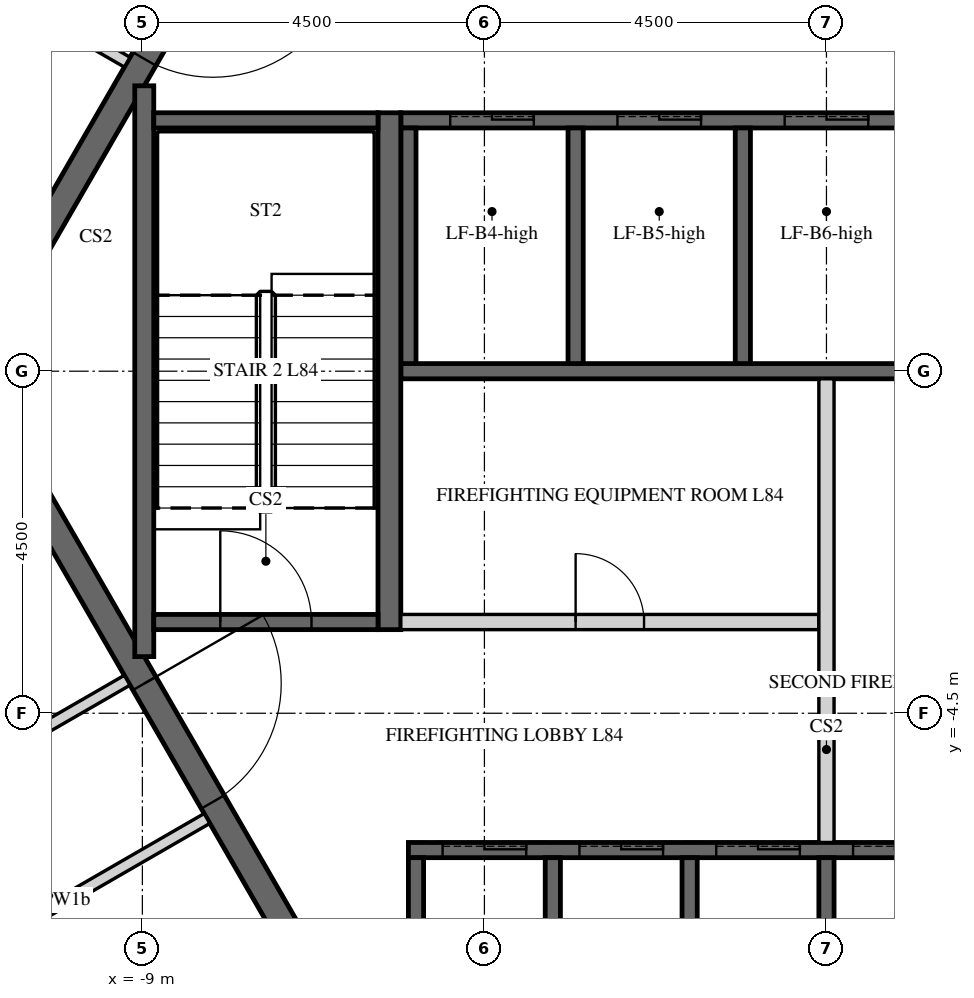
"""IFC4 building model, lengths in metres.
Left out: names, types, materials, properties, quantities, classifications, styles, units other than length and angle.
Written with IfcOpenShell. Run it as: python <this file> out.ifc"""

import sys

from ifc_helpers import new_model, si_unit, direction, frame, frame_2d, origin, place, context, subcontext, project, spatial, polyline, rectangle, outline, extrude, element, fill, save


model = new_model("IFC4")
c1 = context("Model", 3, precision=1e-05, world=origin(), true_north=direction((0.0, 1.0)))
c2 = subcontext(c1, "Body", "Model", "MODEL_VIEW")
j1 = project(units=[si_unit("LENGTHUNIT", "METRE"), si_unit("PLANEANGLEUNIT", "RADIAN")], contexts=[c1])
p1 = place(None, origin())
s1 = spatial("IfcSite", under=j1, at=p1, CompositionType="ELEMENT")
p2 = place(p1, origin())
s2 = spatial("IfcBuilding", under=s1, at=p2, CompositionType="ELEMENT")
p3 = place(p2, frame((0.0, 0.0, 349.5)))
s3 = spatial("IfcBuildingStorey", under=s2, at=p3, CompositionType="ELEMENT", Elevation=349.5)
p4 = place(p3, frame((-5.673, 9.825, 0.0), z_axis=(0.0, 0.0, 1.0), x_axis=(-0.499995046907, -0.866028263435, 0.0)))
e1 = element("IfcWall", 1, at=p4, inside=s3, PredefinedType="SHEAR", context=c2, shape_type="SweptSolid", body=[
    extrude(outline(polyline([(-0.101, -0.175), (11.446, -0.175), (11.244, 0.175), (0.101, 0.175), (-0.101, -0.175)])), origin(), (0.0, 0.0, 1.0), 3.75),
])
p5 = place(p4, frame((4.801, 0.0, 0.0)))
e2 = element("IfcOpeningElement", 2, at=p5, cuts=e1, PredefinedType="OPENING", context=c2, shape_type="SweptSolid", body=[
    extrude(rectangle(XDim=1.8, YDim=2.4, at=frame_2d((0.9, 1.2))), frame((0.0, 0.185, 0.0), z_axis=(0.0, -1.0, 0.0), x_axis=(1.0, 0.0, 0.0)), (0.0, 0.0, 1.0), 0.37),
])
p6 = place(p3, frame((-11.345, 0.0, 0.0), z_axis=(0.0, 0.0, 1.0), x_axis=(0.499995046907, -0.866028263435, 0.0)))
e3 = element("IfcWall", 3, at=p6, inside=s3, PredefinedType="SHEAR", context=c2, shape_type="SweptSolid", body=[
    extrude(outline(polyline([(-0.101, -0.175), (11.446, -0.175), (11.244, 0.175), (0.101, 0.175), (-0.101, -0.175)])), origin(), (0.0, 0.0, 1.0), 3.75),
])
p7 = place(p6, frame((4.744, 0.0, 0.0)))
e4 = element("IfcOpeningElement", 4, at=p7, cuts=e3, PredefinedType="OPENING", context=c2, shape_type="SweptSolid", body=[
    extrude(rectangle(XDim=1.8, YDim=2.4, at=frame_2d((0.9, 1.2))), frame((0.0, 0.185, 0.0), z_axis=(0.0, -1.0, 0.0), x_axis=(1.0, 0.0, 0.0)), (0.0, 0.0, 1.0), 0.37),
])
p8 = place(p3, frame((-5.6, 3.3, -0.5), z_axis=(0.0, 0.0, 1.0), x_axis=(1.0, 0.0, 0.0)))
e5 = element("IfcWall", 5, at=p8, inside=s3, PredefinedType="SHEAR", context=c2, shape_type="SweptSolid", body=[
    extrude(rectangle(XDim=6.6, YDim=0.2, at=frame_2d((3.3, 0.0))), origin(), (0.0, 0.0, 1.0), 4.15),
])
p9 = place(p8, frame((0.65, 0.0, 0.5)))
e6 = element("IfcOpeningElement", 6, at=p9, cuts=e5, PredefinedType="OPENING", context=c2, shape_type="SweptSolid", body=[
    extrude(rectangle(XDim=1.1, YDim=2.1, at=frame_2d((0.55, 1.05))), frame((0.0, 0.11, 0.0), z_axis=(0.0, -1.0, 0.0), x_axis=(1.0, 0.0, 0.0)), (0.0, 0.0, 1.0), 0.22),
])
p10 = place(p8, frame((2.85, 0.0, 0.5)))
e7 = element("IfcOpeningElement", 7, at=p10, cuts=e5, PredefinedType="OPENING", context=c2, shape_type="SweptSolid", body=[
    extrude(rectangle(XDim=1.1, YDim=2.1, at=frame_2d((0.55, 1.05))), frame((0.0, 0.11, 0.0), z_axis=(0.0, -1.0, 0.0), x_axis=(1.0, 0.0, 0.0)), (0.0, 0.0, 1.0), 0.22),
])
p11 = place(p8, frame((5.05, 0.0, 0.5)))
e8 = element("IfcOpeningElement", 8, at=p11, cuts=e5, PredefinedType="OPENING", context=c2, shape_type="SweptSolid", body=[
    extrude(rectangle(XDim=1.1, YDim=2.1, at=frame_2d((0.55, 1.05))), frame((0.0, 0.11, 0.0), z_axis=(0.0, -1.0, 0.0), x_axis=(1.0, 0.0, 0.0)), (0.0, 0.0, 1.0), 0.22),
])
p12 = place(p3, frame((-5.6, 0.0, -0.5), z_axis=(0.0, 0.0, 1.0), x_axis=(1.0, 0.0, 0.0)))
e9 = element("IfcWall", 9, at=p12, inside=s3, PredefinedType="SHEAR", context=c2, shape_type="SweptSolid", body=[
    extrude(rectangle(XDim=11.2, YDim=0.2, at=frame_2d((5.6, 0.0))), origin(), (0.0, 0.0, 1.0), 4.15),
])
for number, where, z_axis, x_axis in (
    (10, (-5.5, 0.1, -0.5), (0.0, 0.0, 1.0), (0.0, 1.0, 0.0)),
    (11, (-3.3, 0.1, -0.5), (0.0, 0.0, 1.0), (0.0, 1.0, 0.0)),
    (12, (-1.1, 0.1, -0.5), (0.0, 0.0, 1.0), (0.0, 1.0, 0.0)),
):
    element("IfcWall", number, at=place(p3, frame(where, z_axis=z_axis, x_axis=x_axis)), inside=s3, PredefinedType="SHEAR", context=c2, shape_type="SweptSolid", body=[
        extrude(rectangle(XDim=3.1, YDim=0.2, at=frame_2d((1.55, 0.0))), origin(), (0.0, 0.0, 1.0), 4.15),
    ])
p13 = place(p3, frame((-5.5, -6.3, -0.5), z_axis=(0.0, 0.0, 1.0), x_axis=(1.0, 0.0, 0.0)))
e13 = element("IfcWall", 13, at=p13, inside=s3, PredefinedType="SHEAR", context=c2, shape_type="SweptSolid", body=[
    extrude(rectangle(XDim=9.2, YDim=0.2, at=frame_2d((4.6, 0.0))), origin(), (0.0, 0.0, 1.0), 4.15),
])
p14 = place(p13, frame((0.45, 0.0, 0.5)))
e14 = element("IfcOpeningElement", 14, at=p14, cuts=e13, PredefinedType="OPENING", context=c2, shape_type="SweptSolid", body=[
    extrude(rectangle(XDim=1.1, YDim=2.1, at=frame_2d((0.55, 1.05))), frame((0.0, 0.11, 0.0), z_axis=(0.0, -1.0, 0.0), x_axis=(1.0, 0.0, 0.0)), (0.0, 0.0, 1.0), 0.22),
])
p15 = place(p13, frame((2.25, 0.0, 0.5)))
e15 = element("IfcOpeningElement", 15, at=p15, cuts=e13, PredefinedType="OPENING", context=c2, shape_type="SweptSolid", body=[
    extrude(rectangle(XDim=1.1, YDim=2.1, at=frame_2d((0.55, 1.05))), frame((0.0, 0.11, 0.0), z_axis=(0.0, -1.0, 0.0), x_axis=(1.0, 0.0, 0.0)), (0.0, 0.0, 1.0), 0.22),
])
p16 = place(p13, frame((4.05, 0.0, 0.5)))
e16 = element("IfcOpeningElement", 16, at=p16, cuts=e13, PredefinedType="OPENING", context=c2, shape_type="SweptSolid", body=[
    extrude(rectangle(XDim=1.1, YDim=2.1, at=frame_2d((0.55, 1.05))), frame((0.0, 0.11, 0.0), z_axis=(0.0, -1.0, 0.0), x_axis=(1.0, 0.0, 0.0)), (0.0, 0.0, 1.0), 0.22),
])
p17 = place(p13, frame((5.85, 0.0, 0.5)))
e17 = element("IfcOpeningElement", 17, at=p17, cuts=e13, PredefinedType="OPENING", context=c2, shape_type="SweptSolid", body=[
    extrude(rectangle(XDim=1.1, YDim=2.1, at=frame_2d((0.55, 1.05))), frame((0.0, 0.11, 0.0), z_axis=(0.0, -1.0, 0.0), x_axis=(1.0, 0.0, 0.0)), (0.0, 0.0, 1.0), 0.22),
])
p18 = place(p13, frame((7.65, 0.0, 0.5)))
e18 = element("IfcOpeningElement", 18, at=p18, cuts=e13, PredefinedType="OPENING", context=c2, shape_type="SweptSolid", body=[
    extrude(rectangle(XDim=1.1, YDim=2.1, at=frame_2d((0.55, 1.05))), frame((0.0, 0.11, 0.0), z_axis=(0.0, -1.0, 0.0), x_axis=(1.0, 0.0, 0.0)), (0.0, 0.0, 1.0), 0.22),
])
for number, where, z_axis, x_axis in (
    (19, (-5.4, -9.3, -0.5), (0.0, 0.0, 1.0), (0.0, 1.0, 0.0)),
    (20, (-3.6, -9.3, -0.5), (0.0, 0.0, 1.0), (0.0, 1.0, 0.0)),
    (21, (-1.8, -9.3, -0.5), (0.0, 0.0, 1.0), (0.0, 1.0, 0.0)),
    (22, (0.0, -9.3, -0.5), (0.0, 0.0, 1.0), (0.0, 1.0, 0.0)),
):
    element("IfcWall", number, at=place(p3, frame(where, z_axis=z_axis, x_axis=x_axis)), inside=s3, PredefinedType="SHEAR", context=c2, shape_type="SweptSolid", body=[
        extrude(rectangle(XDim=2.9, YDim=0.2, at=frame_2d((1.45, 0.0))), origin(), (0.0, 0.0, 1.0), 4.15),
    ])
p19 = place(p3, frame((-5.6, -3.3, 0.0), z_axis=(0.0, 0.0, 1.0), x_axis=(1.0, 0.0, 0.0)))
e23 = element("IfcWall", 23, at=p19, inside=s3, PredefinedType="PARTITIONING", context=c2, shape_type="SweptSolid", body=[
    extrude(rectangle(XDim=5.5, YDim=0.2, at=frame_2d((2.75, 0.0))), origin(), (0.0, 0.0, 1.0), 3.65),
])
p20 = place(p19, frame((2.3, 0.0, 0.0)))
e24 = element("IfcOpeningElement", 24, at=p20, cuts=e23, PredefinedType="OPENING", context=c2, shape_type="SweptSolid", body=[
    extrude(rectangle(XDim=0.9, YDim=2.1, at=frame_2d((0.45, 1.05))), frame((0.0, 0.11, 0.0), z_axis=(0.0, -1.0, 0.0), x_axis=(1.0, 0.0, 0.0)), (0.0, 0.0, 1.0), 0.22),
])
p21 = place(p3, frame((0.0, -6.2, 0.0), z_axis=(0.0, 0.0, 1.0), x_axis=(0.0, 1.0, 0.0)))
e25 = element("IfcWall", 25, at=p21, inside=s3, PredefinedType="PARTITIONING", context=c2, shape_type="SweptSolid", body=[
    extrude(rectangle(XDim=6.1, YDim=0.2, at=frame_2d((3.05, 0.0))), origin(), (0.0, 0.0, 1.0), 3.65),
])
p22 = place(p3, frame((-5.75, -3.4, -0.5), z_axis=(0.0, 0.0, 1.0), x_axis=(0.0, 1.0, 0.0)))
e26 = element("IfcWall", 26, at=p22, inside=s3, PredefinedType="SHEAR", context=c2, shape_type="SweptSolid", body=[
    extrude(rectangle(XDim=6.8, YDim=0.3, at=frame_2d((3.4, 0.0))), origin(), (0.0, 0.0, 1.0), 4.15),
])
p23 = place(p3, frame((-8.975, -3.755, -0.5), z_axis=(0.0, 0.0, 1.0), x_axis=(0.0, 1.0, 0.0)))
e27 = element("IfcWall", 27, at=p23, inside=s3, PredefinedType="SHEAR", context=c2, shape_type="SweptSolid", body=[
    extrude(rectangle(XDim=7.51, YDim=0.25, at=frame_2d((3.755, 0.0))), origin(), (0.0, 0.0, 1.0), 4.15),
])
p24 = place(p3, frame((-8.85, 3.3, -0.5), z_axis=(0.0, 0.0, 1.0), x_axis=(1.0, 0.0, 0.0)))
e28 = element("IfcWall", 28, at=p24, inside=s3, PredefinedType="SHEAR", context=c2, shape_type="SweptSolid", body=[
    extrude(rectangle(XDim=2.95, YDim=0.2, at=frame_2d((1.475, 0.0))), origin(), (0.0, 0.0, 1.0), 4.15),
])
p25 = place(p3, frame((-8.85, -3.3, -0.5), z_axis=(0.0, 0.0, 1.0), x_axis=(1.0, 0.0, 0.0)))
e29 = element("IfcWall", 29, at=p25, inside=s3, PredefinedType="SHEAR", context=c2, shape_type="SweptSolid", body=[
    extrude(rectangle(XDim=2.95, YDim=0.2, at=frame_2d((1.475, 0.0))), origin(), (0.0, 0.0, 1.0), 4.15),
])
p26 = place(p25, frame((0.875, 0.0, 0.5)))
e30 = element("IfcOpeningElement", 30, at=p26, cuts=e29, PredefinedType="OPENING", context=c2, shape_type="SweptSolid", body=[
    extrude(rectangle(XDim=1.2, YDim=2.4, at=frame_2d((0.6, 1.2))), frame((0.0, 0.11, 0.0), z_axis=(0.0, -1.0, 0.0), x_axis=(1.0, 0.0, 0.0)), (0.0, 0.0, 1.0), 0.22),
])
p27 = place(p3, frame((-7.903, 16.075, 0.0), z_axis=(0.0, 0.0, 1.0), x_axis=(-0.438364761272, -0.898797160696, 0.0)))
e31 = element("IfcWall", 31, at=p27, inside=s3, PredefinedType="PARTITIONING", context=c2, shape_type="SweptSolid", body=[
    extrude(rectangle(XDim=15.688, YDim=0.15, at=frame_2d((7.844, 0.0))), origin(), (0.0, 0.0, 1.0), 2.82),
])
p28 = place(p27, frame((2.942, 0.0, 0.0)))
e32 = element("IfcOpeningElement", 32, at=p28, cuts=e31, PredefinedType="OPENING", context=c2, shape_type="SweptSolid", body=[
    extrude(rectangle(XDim=1.0, YDim=2.1, at=frame_2d((0.5, 1.05))), frame((0.0, 0.085, 0.0), z_axis=(0.0, -1.0, 0.0), x_axis=(1.0, 0.0, 0.0)), (0.0, 0.0, 1.0), 0.17),
])
p29 = place(p3, frame((-11.131, 5.18, 0.0), z_axis=(0.0, 0.0, 1.0), x_axis=(0.866037886895, -0.499978377995, 0.0)))
e33 = element("IfcWall", 33, at=p29, inside=s3, PredefinedType="PARTITIONING", context=c2, shape_type="SweptSolid", body=[
    extrude(rectangle(XDim=2.229, YDim=0.15, at=frame_2d((1.115, 0.0))), origin(), (0.0, 0.0, 1.0), 2.82),
])
p30 = place(p3, frame((-17.036, -2.792, 0.0), z_axis=(0.0, 0.0, 1.0), x_axis=(0.500006428338, -0.86602169235, 0.0)))
e34 = element("IfcWall", 34, at=p30, inside=s3, PredefinedType="PARTITIONING", context=c2, shape_type="SweptSolid", body=[
    extrude(rectangle(XDim=13.966, YDim=0.15, at=frame_2d((6.983, 0.0))), origin(), (0.0, 0.0, 1.0), 2.82),
])
p31 = place(p30, frame((3.325, 0.0, 0.0)))
e35 = element("IfcOpeningElement", 35, at=p31, cuts=e34, PredefinedType="OPENING", context=c2, shape_type="SweptSolid", body=[
    extrude(rectangle(XDim=1.0, YDim=2.1, at=frame_2d((0.5, 1.05))), frame((0.0, 0.085, 0.0), z_axis=(0.0, -1.0, 0.0), x_axis=(1.0, 0.0, 0.0)), (0.0, 0.0, 1.0), 0.17),
])
p32 = place(p3, frame((-9.2, -4.066, 0.0), z_axis=(0.0, 0.0, 1.0), x_axis=(-0.866013608182, -0.500020430026, 0.0)))
e36 = element("IfcWall", 36, at=p32, inside=s3, PredefinedType="PARTITIONING", context=c2, shape_type="SweptSolid", body=[
    extrude(rectangle(XDim=4.35, YDim=0.15, at=frame_2d((2.175, 0.0))), origin(), (0.0, 0.0, 1.0), 2.82),
])
p33 = place(p32, frame((1.725, 0.0, 0.0)))
e37 = element("IfcOpeningElement", 37, at=p33, cuts=e36, PredefinedType="OPENING", context=c2, shape_type="SweptSolid", body=[
    extrude(rectangle(XDim=0.9, YDim=2.1, at=frame_2d((0.45, 1.05))), frame((0.0, 0.085, 0.0), z_axis=(0.0, -1.0, 0.0), x_axis=(1.0, 0.0, 0.0)), (0.0, 0.0, 1.0), 0.17),
])
p34 = place(p3, frame((-11.852, -8.022, 0.0), z_axis=(0.0, 0.0, 1.0), x_axis=(0.866038183914, 0.499977863513, 0.0)))
e38 = element("IfcWall", 38, at=p34, inside=s3, PredefinedType="PARTITIONING", context=c2, shape_type="SweptSolid", body=[
    extrude(rectangle(XDim=4.275, YDim=0.15, at=frame_2d((2.138, 0.0))), origin(), (0.0, 0.0, 1.0), 2.82),
])
p35 = place(p5, origin())
e39 = element("IfcDoor", 39, at=p35, inside=s3, OperationType="DOUBLE_DOOR_SINGLE_SWING", PredefinedType="DOOR", context=c2, shape_type="SweptSolid", body=[
    extrude(rectangle(XDim=1.8, YDim=2.4, at=frame_2d((0.9, 1.2))), frame((0.0, 0.025, 0.0), z_axis=(0.0, -1.0, 0.0), x_axis=(1.0, 0.0, 0.0)), (0.0, 0.0, 1.0), 0.05),
])
fill(e2, e39)
p36 = place(p7, origin())
e40 = element("IfcDoor", 40, at=p36, inside=s3, OperationType="DOUBLE_DOOR_SINGLE_SWING", PredefinedType="DOOR", context=c2, shape_type="SweptSolid", body=[
    extrude(rectangle(XDim=1.8, YDim=2.4, at=frame_2d((0.9, 1.2))), frame((0.0, 0.025, 0.0), z_axis=(0.0, -1.0, 0.0), x_axis=(1.0, 0.0, 0.0)), (0.0, 0.0, 1.0), 0.05),
])
fill(e4, e40)
p37 = place(p20, origin())
e41 = element("IfcDoor", 41, at=p37, inside=s3, OperationType="SINGLE_SWING_LEFT", PredefinedType="DOOR", context=c2, shape_type="SweptSolid", body=[
    extrude(rectangle(XDim=0.9, YDim=2.1, at=frame_2d((0.45, 1.05))), frame((0.0, 0.025, 0.0), z_axis=(0.0, -1.0, 0.0), x_axis=(1.0, 0.0, 0.0)), (0.0, 0.0, 1.0), 0.05),
])
fill(e24, e41)
p38 = place(p26, origin())
e42 = element("IfcDoor", 42, at=p38, inside=s3, OperationType="SINGLE_SWING_LEFT", PredefinedType="DOOR", context=c2, shape_type="SweptSolid", body=[
    extrude(rectangle(XDim=1.2, YDim=2.4, at=frame_2d((0.6, 1.2))), frame((0.0, 0.025, 0.0), z_axis=(0.0, -1.0, 0.0), x_axis=(1.0, 0.0, 0.0)), (0.0, 0.0, 1.0), 0.05),
])
fill(e30, e42)
p39 = place(p9, origin())
e43 = element("IfcDoor", 43, at=p39, inside=s3, OperationType="SLIDING_TO_LEFT", PredefinedType="DOOR", context=c2, shape_type="SweptSolid", body=[
    extrude(rectangle(XDim=1.1, YDim=2.1, at=frame_2d((0.55, 1.05))), frame((0.0, 0.025, 0.0), z_axis=(0.0, -1.0, 0.0), x_axis=(1.0, 0.0, 0.0)), (0.0, 0.0, 1.0), 0.05),
])
fill(e6, e43)
p40 = place(p10, origin())
e44 = element("IfcDoor", 44, at=p40, inside=s3, OperationType="SLIDING_TO_LEFT", PredefinedType="DOOR", context=c2, shape_type="SweptSolid", body=[
    extrude(rectangle(XDim=1.1, YDim=2.1, at=frame_2d((0.55, 1.05))), frame((0.0, 0.025, 0.0), z_axis=(0.0, -1.0, 0.0), x_axis=(1.0, 0.0, 0.0)), (0.0, 0.0, 1.0), 0.05),
])
fill(e7, e44)
p41 = place(p11, origin())
e45 = element("IfcDoor", 45, at=p41, inside=s3, OperationType="SLIDING_TO_LEFT", PredefinedType="DOOR", context=c2, shape_type="SweptSolid", body=[
    extrude(rectangle(XDim=1.1, YDim=2.1, at=frame_2d((0.55, 1.05))), frame((0.0, 0.025, 0.0), z_axis=(0.0, -1.0, 0.0), x_axis=(1.0, 0.0, 0.0)), (0.0, 0.0, 1.0), 0.05),
])
fill(e8, e45)
p42 = place(p14, origin())
e46 = element("IfcDoor", 46, at=p42, inside=s3, OperationType="SLIDING_TO_LEFT", PredefinedType="DOOR", context=c2, shape_type="SweptSolid", body=[
    extrude(rectangle(XDim=1.1, YDim=2.1, at=frame_2d((0.55, 1.05))), frame((0.0, 0.025, 0.0), z_axis=(0.0, -1.0, 0.0), x_axis=(1.0, 0.0, 0.0)), (0.0, 0.0, 1.0), 0.05),
])
fill(e14, e46)
p43 = place(p15, origin())
e47 = element("IfcDoor", 47, at=p43, inside=s3, OperationType="SLIDING_TO_LEFT", PredefinedType="DOOR", context=c2, shape_type="SweptSolid", body=[
    extrude(rectangle(XDim=1.1, YDim=2.1, at=frame_2d((0.55, 1.05))), frame((0.0, 0.025, 0.0), z_axis=(0.0, -1.0, 0.0), x_axis=(1.0, 0.0, 0.0)), (0.0, 0.0, 1.0), 0.05),
])
fill(e15, e47)
p44 = place(p16, origin())
e48 = element("IfcDoor", 48, at=p44, inside=s3, OperationType="SLIDING_TO_LEFT", PredefinedType="DOOR", context=c2, shape_type="SweptSolid", body=[
    extrude(rectangle(XDim=1.1, YDim=2.1, at=frame_2d((0.55, 1.05))), frame((0.0, 0.025, 0.0), z_axis=(0.0, -1.0, 0.0), x_axis=(1.0, 0.0, 0.0)), (0.0, 0.0, 1.0), 0.05),
])
fill(e16, e48)
p45 = place(p17, origin())
e49 = element("IfcDoor", 49, at=p45, inside=s3, OperationType="SLIDING_TO_LEFT", PredefinedType="DOOR", context=c2, shape_type="SweptSolid", body=[
    extrude(rectangle(XDim=1.1, YDim=2.1, at=frame_2d((0.55, 1.05))), frame((0.0, 0.025, 0.0), z_axis=(0.0, -1.0, 0.0), x_axis=(1.0, 0.0, 0.0)), (0.0, 0.0, 1.0), 0.05),
])
fill(e17, e49)
save(model, sys.argv[1])
